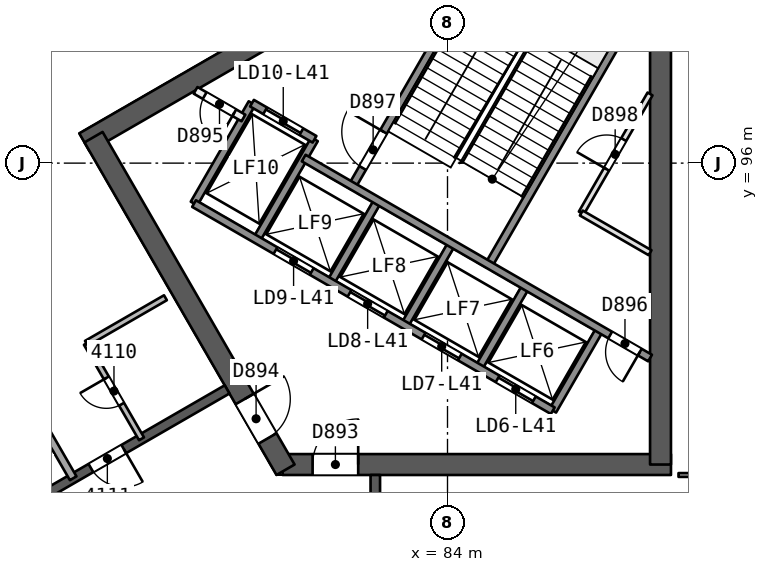
"""IFC4 building model, lengths in metres.
Left out: names, types, materials, properties, quantities, classifications, styles, units other than length and angle.
Written with IfcOpenShell. Run it as: python <this file> out.ifc"""

import sys

from ifc_helpers import new_model, si_unit, direction, frame, frame_2d, origin, place, context, subcontext, project, spatial, rectangle, extrude, element, fill, save


model = new_model("IFC4")
c1 = context("Model", 3, precision=1e-05, world=origin(), true_north=direction((0.0, 1.0)))
c2 = subcontext(c1, "Body", "Model", "MODEL_VIEW")
j1 = project(units=[si_unit("LENGTHUNIT", "METRE"), si_unit("PLANEANGLEUNIT", "RADIAN")], contexts=[c1])
p1 = place(None, origin())
s1 = spatial("IfcSite", under=j1, at=p1, CompositionType="ELEMENT")
p2 = place(p1, origin())
s2 = spatial("IfcBuilding", under=s1, at=p2, CompositionType="ELEMENT")
p3 = place(p2, frame((0.0, 0.0, 171.1)))
s3 = spatial("IfcBuildingStorey", under=s2, at=p3, CompositionType="ELEMENT", Elevation=171.1)
p4 = place(p3, frame((79.659, 88.069, 0.0), z_axis=(0.0, 0.0, 1.0), x_axis=(1.0, 0.0, 0.0)))
e1 = element("IfcWall", 1, at=p4, inside=s3, PredefinedType="SHEAR", context=c2, shape_type="SweptSolid", body=[
    extrude(rectangle(XDim=10.221, YDim=0.55, at=frame_2d((5.111, 0.0))), origin(), (0.0, 0.0, 1.0), 3.7),
])
p5 = place(p4, frame((0.791, 0.0, 0.0)))
e2 = element("IfcOpeningElement", 2, at=p5, cuts=e1, PredefinedType="OPENING", context=c2, shape_type="SweptSolid", body=[
    extrude(rectangle(XDim=1.2, YDim=2.1, at=frame_2d((0.6, 1.05))), frame((0.0, 0.286, 0.0), z_axis=(0.0, -1.0, 0.0), x_axis=(1.0, 0.0, 0.0)), (0.0, 0.0, 1.0), 0.571),
])
p6 = place(p3, frame((89.605, 88.069, 0.0), z_axis=(0.0, 0.0, 1.0), x_axis=(0.0, 1.0, 0.0)))
e3 = element("IfcWall", 3, at=p6, inside=s3, PredefinedType="SHEAR", context=c2, shape_type="SweptSolid", body=[
    extrude(rectangle(XDim=14.058, YDim=0.55, at=frame_2d((7.029, 0.0))), origin(), (0.0, 0.0, 1.0), 3.7),
])
p7 = place(p3, frame((86.723, 103.633, 0.0), z_axis=(0.0, 0.0, 1.0), x_axis=(-0.866023530946, -0.500003243837, 0.0)))
e4 = element("IfcWall", 4, at=p7, inside=s3, PredefinedType="SHEAR", context=c2, shape_type="SweptSolid", body=[
    extrude(rectangle(XDim=14.175, YDim=0.55, at=frame_2d((7.087, 0.0))), origin(), (0.0, 0.0, 1.0), 3.7),
])
p8 = place(p3, frame((74.686, 96.683, 0.0), z_axis=(0.0, 0.0, 1.0), x_axis=(0.499997818338, -0.866026663364, 0.0)))
e5 = element("IfcWall", 5, at=p8, inside=s3, PredefinedType="SHEAR", context=c2, shape_type="SweptSolid", body=[
    extrude(rectangle(XDim=10.105, YDim=0.55, at=frame_2d((5.052, 0.0))), origin(), (0.0, 0.0, 1.0), 3.7),
])
p9 = place(p8, frame((7.955, 0.0, 0.0)))
e6 = element("IfcOpeningElement", 6, at=p9, cuts=e5, PredefinedType="OPENING", context=c2, shape_type="SweptSolid", body=[
    extrude(rectangle(XDim=1.2, YDim=2.1, at=frame_2d((0.6, 1.05))), frame((0.0, 0.286, 0.0), z_axis=(0.0, -1.0, 0.0), x_axis=(1.0, 0.0, 0.0)), (0.0, 0.0, 1.0), 0.571),
])
p10 = place(p3, frame((82.1, 72.206, 0.0), z_axis=(0.0, 0.0, 1.0), x_axis=(0.0, 1.0, 0.0)))
e7 = element("IfcWall", 7, at=p10, inside=s3, PredefinedType="SHEAR", context=c2, shape_type="SweptSolid", body=[
    extrude(rectangle(XDim=15.588, YDim=0.25, at=frame_2d((7.794, 0.0))), origin(), (0.0, 0.0, 1.0), 3.25),
])
p11 = place(p10, frame((2.618, 0.0, 0.0)))
e8 = element("IfcOpeningElement", 8, at=p11, cuts=e7, PredefinedType="OPENING", context=c2, shape_type="SweptSolid", body=[
    extrude(rectangle(XDim=1.0, YDim=2.1, at=frame_2d((0.5, 1.05))), frame((0.0, 0.135, 0.0), z_axis=(0.0, -1.0, 0.0), x_axis=(1.0, 0.0, 0.0)), (0.0, 0.0, 1.0), 0.271),
])
p12 = place(p10, frame((8.285, 0.0, 0.0)))
e9 = element("IfcOpeningElement", 9, at=p12, cuts=e7, PredefinedType="OPENING", context=c2, shape_type="SweptSolid", body=[
    extrude(rectangle(XDim=1.2, YDim=2.4, at=frame_2d((0.6, 1.2))), frame((0.0, 0.135, 0.0), z_axis=(0.0, -1.0, 0.0), x_axis=(1.0, 0.0, 0.0)), (0.0, 0.0, 1.0), 0.271),
])
p13 = place(p10, frame((13.062, 0.0, 0.0)))
e10 = element("IfcOpeningElement", 10, at=p13, cuts=e7, PredefinedType="OPENING", context=c2, shape_type="SweptSolid", body=[
    extrude(rectangle(XDim=1.0, YDim=2.1, at=frame_2d((0.5, 1.05))), frame((0.0, 0.135, 0.0), z_axis=(0.0, -1.0, 0.0), x_axis=(1.0, 0.0, 0.0)), (0.0, 0.0, 1.0), 0.271),
])
p14 = place(p3, frame((78.2, 90.046, 0.0), z_axis=(0.0, 0.0, 1.0), x_axis=(-0.866026492143, -0.499998114903, 0.0)))
e11 = element("IfcWall", 11, at=p14, inside=s3, PredefinedType="SHEAR", context=c2, shape_type="SweptSolid", body=[
    extrude(rectangle(XDim=15.588, YDim=0.25, at=frame_2d((7.794, 0.0))), origin(), (0.0, 0.0, 1.0), 3.25),
])
p15 = place(p14, frame((3.138, 0.0, 0.0)))
e12 = element("IfcOpeningElement", 12, at=p15, cuts=e11, PredefinedType="OPENING", context=c2, shape_type="SweptSolid", body=[
    extrude(rectangle(XDim=1.0, YDim=2.1, at=frame_2d((0.5, 1.05))), frame((0.0, 0.135, 0.0), z_axis=(0.0, -1.0, 0.0), x_axis=(1.0, 0.0, 0.0)), (0.0, 0.0, 1.0), 0.271),
])
p16 = place(p14, frame((5.629, 0.0, 0.0)))
e13 = element("IfcOpeningElement", 13, at=p16, cuts=e11, PredefinedType="OPENING", context=c2, shape_type="SweptSolid", body=[
    extrude(rectangle(XDim=0.9, YDim=2.1, at=frame_2d((0.45, 1.05))), frame((0.0, 0.135, 0.0), z_axis=(0.0, -1.0, 0.0), x_axis=(1.0, 0.0, 0.0)), (0.0, 0.0, 1.0), 0.271),
])
p17 = place(p14, frame((8.435, 0.0, 0.0)))
e14 = element("IfcOpeningElement", 14, at=p17, cuts=e11, PredefinedType="OPENING", context=c2, shape_type="SweptSolid", body=[
    extrude(rectangle(XDim=0.9, YDim=2.1, at=frame_2d((0.45, 1.05))), frame((0.0, 0.135, 0.0), z_axis=(0.0, -1.0, 0.0), x_axis=(1.0, 0.0, 0.0)), (0.0, 0.0, 1.0), 0.271),
])
p18 = place(p14, frame((12.438, 0.0, 0.0)))
e15 = element("IfcOpeningElement", 15, at=p18, cuts=e11, PredefinedType="OPENING", context=c2, shape_type="SweptSolid", body=[
    extrude(rectangle(XDim=1.0, YDim=2.1, at=frame_2d((0.5, 1.05))), frame((0.0, 0.135, 0.0), z_axis=(0.0, -1.0, 0.0), x_axis=(1.0, 0.0, 0.0)), (0.0, 0.0, 1.0), 0.271),
])
p19 = place(p3, frame((93.502, 87.794, 0.0), z_axis=(0.0, 0.0, 1.0), x_axis=(-1.0, 0.0, 0.0)))
e16 = element("IfcWall", 16, at=p19, inside=s3, PredefinedType="PARTITIONING", context=c2, shape_type="SweptSolid", body=[
    extrude(rectangle(XDim=3.423, YDim=0.1, at=frame_2d((1.712, 0.0))), origin(), (0.0, 0.0, 1.0), 3.25),
])
p20 = place(p19, frame((1.262, 0.0, 0.0)))
e17 = element("IfcOpeningElement", 17, at=p20, cuts=e16, PredefinedType="OPENING", context=c2, shape_type="SweptSolid", body=[
    extrude(rectangle(XDim=0.9, YDim=2.1, at=frame_2d((0.45, 1.05))), frame((0.0, 0.061, 0.0), z_axis=(0.0, -1.0, 0.0), x_axis=(1.0, 0.0, 0.0)), (0.0, 0.0, 1.0), 0.121),
])
p21 = place(p3, frame((75.948, 88.746, 0.0), z_axis=(0.0, 0.0, 1.0), x_axis=(-0.499987231761, 0.866032775405, 0.0)))
e18 = element("IfcWall", 18, at=p21, inside=s3, PredefinedType="PARTITIONING", context=c2, shape_type="SweptSolid", body=[
    extrude(rectangle(XDim=2.9, YDim=0.15, at=frame_2d((1.45, 0.0))), origin(), (0.0, 0.0, 1.0), 3.25),
])
p22 = place(p21, frame((1.05, 0.0, 0.0)))
e19 = element("IfcOpeningElement", 19, at=p22, cuts=e18, PredefinedType="OPENING", context=c2, shape_type="SweptSolid", body=[
    extrude(rectangle(XDim=0.8, YDim=2.1, at=frame_2d((0.4, 1.05))), frame((0.0, 0.085, 0.0), z_axis=(0.0, -1.0, 0.0), x_axis=(1.0, 0.0, 0.0)), (0.0, 0.0, 1.0), 0.171),
])
p23 = place(p3, frame((74.498, 91.257, 0.0), z_axis=(0.0, 0.0, 1.0), x_axis=(0.866038271014, 0.499977712642, 0.0)))
e20 = element("IfcWall", 20, at=p23, inside=s3, PredefinedType="PARTITIONING", context=c2, shape_type="SweptSolid", body=[
    extrude(rectangle(XDim=2.401, YDim=0.15, at=frame_2d((1.2, 0.0))), origin(), (0.0, 0.0, 1.0), 3.25),
])
p24 = place(p3, frame((68.449, 97.582, 0.0), z_axis=(0.0, 0.0, 1.0), x_axis=(0.499998613539, -0.866026204257, 0.0)))
e21 = element("IfcWall", 21, at=p24, inside=s3, PredefinedType="PARTITIONING", context=c2, shape_type="SweptSolid", body=[
    extrude(rectangle(XDim=11.402, YDim=0.2, at=frame_2d((5.701, 0.0))), origin(), (0.0, 0.0, 1.0), 3.25),
])
p25 = place(p3, frame((42.45, 82.744, 0.0), z_axis=(0.0, 0.0, 1.0), x_axis=(0.866024128163, 0.500002209434, 0.0)))
e22 = element("IfcWall", 22, at=p25, inside=s3, PredefinedType="SOLIDWALL", context=c2, shape_type="SweptSolid", body=[
    extrude(rectangle(XDim=53.635, YDim=0.3, at=frame_2d((26.817, 0.0))), origin(), (0.0, 0.0, 1.0), 3.25),
])
p26 = place(p25, frame((20.473, 0.0, 0.0)))
e23 = element("IfcOpeningElement", 23, at=p26, cuts=e22, PredefinedType="OPENING", context=c2, shape_type="SweptSolid", body=[
    extrude(rectangle(XDim=2.4, YDim=2.4, at=frame_2d((1.2, 1.2))), frame((0.0, 0.161, 0.0), z_axis=(0.0, -1.0, 0.0), x_axis=(1.0, 0.0, 0.0)), (0.0, 0.0, 1.0), 0.321),
])
p27 = place(p25, frame((9.514, 0.0, 0.0)))
e24 = element("IfcOpeningElement", 24, at=p27, cuts=e22, PredefinedType="OPENING", context=c2, shape_type="SweptSolid", body=[
    extrude(rectangle(XDim=2.4, YDim=2.4, at=frame_2d((1.2, 1.2))), frame((0.0, 0.161, 0.0), z_axis=(0.0, -1.0, 0.0), x_axis=(1.0, 0.0, 0.0)), (0.0, 0.0, 1.0), 0.321),
])
p28 = place(p25, frame((40.628, 0.0, 0.0)))
e25 = element("IfcOpeningElement", 25, at=p28, cuts=e22, PredefinedType="OPENING", context=c2, shape_type="SweptSolid", body=[
    extrude(rectangle(XDim=2.4, YDim=2.4, at=frame_2d((1.2, 1.2))), frame((0.0, 0.161, 0.0), z_axis=(0.0, -1.0, 0.0), x_axis=(1.0, 0.0, 0.0)), (0.0, 0.0, 1.0), 0.321),
])
p29 = place(p25, frame((27.632, 0.0, 0.9)))
e26 = element("IfcOpeningElement", 26, at=p29, cuts=e22, PredefinedType="OPENING", context=c2, shape_type="SweptSolid", body=[
    extrude(rectangle(XDim=1.8, YDim=1.5, at=frame_2d((0.9, 0.75))), frame((0.0, 0.161, 0.0), z_axis=(0.0, -1.0, 0.0), x_axis=(1.0, 0.0, 0.0)), (0.0, 0.0, 1.0), 0.321),
])
p30 = place(p25, frame((24.826, 0.0, 0.9)))
e27 = element("IfcOpeningElement", 27, at=p30, cuts=e22, PredefinedType="OPENING", context=c2, shape_type="SweptSolid", body=[
    extrude(rectangle(XDim=1.8, YDim=1.5, at=frame_2d((0.9, 0.75))), frame((0.0, 0.161, 0.0), z_axis=(0.0, -1.0, 0.0), x_axis=(1.0, 0.0, 0.0)), (0.0, 0.0, 1.0), 0.321),
])
p31 = place(p3, frame((86.77, 89.486, 0.0), z_axis=(0.0, 0.0, 1.0), x_axis=(0.499961042966, 0.86604789447, 0.0)))
e28 = element("IfcWall", 28, at=p31, inside=s3, PredefinedType="SOLIDWALL", context=c2, shape_type="SweptSolid", body=[
    extrude(rectangle(XDim=2.48, YDim=0.2, at=frame_2d((1.24, 0.0))), origin(), (0.0, 0.0, 1.0), 3.25),
])
p32 = place(p3, frame((87.521, 94.687, 0.0), z_axis=(0.0, 0.0, 1.0), x_axis=(0.500043727655, 0.866000156139, 0.0)))
e29 = element("IfcWall", 29, at=p32, inside=s3, PredefinedType="PARTITIONING", context=c2, shape_type="SweptSolid", body=[
    extrude(rectangle(XDim=3.618, YDim=0.15, at=frame_2d((1.809, 0.0))), origin(), (0.0, 0.0, 1.0), 3.25),
])
p33 = place(p32, frame((1.332, 0.0, 0.0)))
e30 = element("IfcOpeningElement", 30, at=p33, cuts=e29, PredefinedType="OPENING", context=c2, shape_type="SweptSolid", body=[
    extrude(rectangle(XDim=0.9, YDim=2.1, at=frame_2d((0.45, 1.05))), frame((0.0, 0.085, 0.0), z_axis=(0.0, -1.0, 0.0), x_axis=(1.0, 0.0, 0.0)), (0.0, 0.0, 1.0), 0.171),
])
p34 = place(p3, frame((84.821, 90.611, 0.0), z_axis=(0.0, 0.0, 1.0), x_axis=(0.499961042966, 0.86604789447, 0.0)))
e31 = element("IfcWall", 31, at=p34, inside=s3, PredefinedType="SOLIDWALL", context=c2, shape_type="SweptSolid", body=[
    extrude(rectangle(XDim=2.48, YDim=0.2, at=frame_2d((1.24, 0.0))), origin(), (0.0, 0.0, 1.0), 3.25),
])
p35 = place(p3, frame((85.087, 93.321, 0.0), z_axis=(0.0, 0.0, 1.0), x_axis=(0.500019787375, 0.866013979237, 0.0)))
e32 = element("IfcWall", 32, at=p35, inside=s3, PredefinedType="SOLIDWALL", context=c2, shape_type="SweptSolid", body=[
    extrude(rectangle(XDim=7.7, YDim=0.2, at=frame_2d((3.85, 0.0))), origin(), (0.0, 0.0, 1.0), 3.25),
])
for number, where, z_axis, x_axis in (
    (33, (82.873, 91.736, 0.0), (0.0, 0.0, 1.0), (0.5, 0.866, 0.0)),
    (34, (80.924, 92.861, 0.0), (0.0, 0.0, 1.0), (0.5, 0.866, 0.0)),
):
    element("IfcWall", number, at=place(p3, frame(where, z_axis=z_axis, x_axis=x_axis)), inside=s3, PredefinedType="SOLIDWALL", context=c2, shape_type="SweptSolid", body=[
        extrude(rectangle(XDim=2.48, YDim=0.2, at=frame_2d((1.24, 0.0))), origin(), (0.0, 0.0, 1.0), 3.25),
    ])
p36 = place(p3, frame((81.493, 95.396, 0.0), z_axis=(0.0, 0.0, 1.0), x_axis=(0.500006057782, 0.866021906294, 0.0)))
e35 = element("IfcWall", 35, at=p36, inside=s3, PredefinedType="SOLIDWALL", context=c2, shape_type="SweptSolid", body=[
    extrude(rectangle(XDim=7.7, YDim=0.2, at=frame_2d((3.85, 0.0))), origin(), (0.0, 0.0, 1.0), 3.25),
])
p37 = place(p36, frame((0.55, 0.0, 0.0)))
e36 = element("IfcOpeningElement", 36, at=p37, cuts=e35, PredefinedType="OPENING", context=c2, shape_type="SweptSolid", body=[
    extrude(rectangle(XDim=1.1, YDim=2.1, at=frame_2d((0.55, 1.05))), frame((0.0, 0.11, 0.0), z_axis=(0.0, -1.0, 0.0), x_axis=(1.0, 0.0, 0.0)), (0.0, 0.0, 1.0), 0.221),
])
for number, where, z_axis, x_axis in (
    (37, (78.976, 93.986, 0.0), (0.0, 0.0, 1.0), (0.5, 0.866, 0.0)),
    (38, (77.33, 94.936, 0.0), (0.0, 0.0, 1.0), (0.5, 0.866, 0.0)),
):
    element("IfcWall", number, at=place(p3, frame(where, z_axis=z_axis, x_axis=x_axis)), inside=s3, PredefinedType="SOLIDWALL", context=c2, shape_type="SweptSolid", body=[
        extrude(rectangle(XDim=3.05, YDim=0.2, at=frame_2d((1.525, 0.0))), origin(), (0.0, 0.0, 1.0), 3.25),
    ])
p38 = place(p3, frame((86.77, 89.486, 0.0), z_axis=(0.0, 0.0, 1.0), x_axis=(-0.86601811187, 0.500012629753, 0.0)))
e39 = element("IfcWall", 39, at=p38, inside=s3, PredefinedType="SOLIDWALL", context=c2, shape_type="SweptSolid", body=[
    extrude(rectangle(XDim=10.9, YDim=0.2, at=frame_2d((5.45, 0.0))), origin(), (0.0, 0.0, 1.0), 3.25),
])
p39 = place(p38, frame((0.575, 0.0, 0.0)))
e40 = element("IfcOpeningElement", 40, at=p39, cuts=e39, PredefinedType="OPENING", context=c2, shape_type="SweptSolid", body=[
    extrude(rectangle(XDim=1.1, YDim=2.1, at=frame_2d((0.55, 1.05))), frame((0.0, 0.11, 0.0), z_axis=(0.0, -1.0, 0.0), x_axis=(1.0, 0.0, 0.0)), (0.0, 0.0, 1.0), 0.221),
])
p40 = place(p38, frame((2.825, 0.0, 0.0)))
e41 = element("IfcOpeningElement", 41, at=p40, cuts=e39, PredefinedType="OPENING", context=c2, shape_type="SweptSolid", body=[
    extrude(rectangle(XDim=1.1, YDim=2.1, at=frame_2d((0.55, 1.05))), frame((0.0, 0.11, 0.0), z_axis=(0.0, -1.0, 0.0), x_axis=(1.0, 0.0, 0.0)), (0.0, 0.0, 1.0), 0.221),
])
p41 = place(p38, frame((5.075, 0.0, 0.0)))
e42 = element("IfcOpeningElement", 42, at=p41, cuts=e39, PredefinedType="OPENING", context=c2, shape_type="SweptSolid", body=[
    extrude(rectangle(XDim=1.1, YDim=2.1, at=frame_2d((0.55, 1.05))), frame((0.0, 0.11, 0.0), z_axis=(0.0, -1.0, 0.0), x_axis=(1.0, 0.0, 0.0)), (0.0, 0.0, 1.0), 0.221),
])
p42 = place(p38, frame((7.325, 0.0, 0.0)))
e43 = element("IfcOpeningElement", 43, at=p42, cuts=e39, PredefinedType="OPENING", context=c2, shape_type="SweptSolid", body=[
    extrude(rectangle(XDim=1.1, YDim=2.1, at=frame_2d((0.55, 1.05))), frame((0.0, 0.11, 0.0), z_axis=(0.0, -1.0, 0.0), x_axis=(1.0, 0.0, 0.0)), (0.0, 0.0, 1.0), 0.221),
])
p43 = place(p3, frame((89.33, 90.872, 0.0), z_axis=(0.0, 0.0, 1.0), x_axis=(-0.866027589512, 0.49999621419, 0.0)))
e44 = element("IfcWall", 44, at=p43, inside=s3, PredefinedType="SOLIDWALL", context=c2, shape_type="SweptSolid", body=[
    extrude(rectangle(XDim=10.524, YDim=0.2, at=frame_2d((5.262, 0.0))), origin(), (0.0, 0.0, 1.0), 3.25),
])
p44 = place(p43, frame((0.312, 0.0, 0.0)))
e45 = element("IfcOpeningElement", 45, at=p44, cuts=e44, PredefinedType="OPENING", context=c2, shape_type="SweptSolid", body=[
    extrude(rectangle(XDim=0.9, YDim=2.1, at=frame_2d((0.45, 1.05))), frame((0.0, 0.11, 0.0), z_axis=(0.0, -1.0, 0.0), x_axis=(1.0, 0.0, 0.0)), (0.0, 0.0, 1.0), 0.221),
])
p45 = place(p3, frame((78.63, 97.188, 0.0), z_axis=(0.0, 0.0, 1.0), x_axis=(-0.866003949776, 0.500037157592, 0.0)))
e46 = element("IfcWall", 46, at=p45, inside=s3, PredefinedType="PARTITIONING", context=c2, shape_type="SweptSolid", body=[
    extrude(rectangle(XDim=1.455, YDim=0.2, at=frame_2d((0.728, 0.0))), origin(), (0.0, 0.0, 1.0), 3.25),
])
p46 = place(p45, frame((0.278, 0.0, 0.0)))
e47 = element("IfcOpeningElement", 47, at=p46, cuts=e46, PredefinedType="OPENING", context=c2, shape_type="SweptSolid", body=[
    extrude(rectangle(XDim=0.9, YDim=2.1, at=frame_2d((0.45, 1.05))), frame((0.0, 0.11, 0.0), z_axis=(0.0, -1.0, 0.0), x_axis=(1.0, 0.0, 0.0)), (0.0, 0.0, 1.0), 0.221),
])
p47 = place(p3, frame((80.5, 96.627, 0.0), z_axis=(0.0, 0.0, 1.0), x_axis=(-0.86601224135, 0.500022797313, 0.0)))
e48 = element("IfcWall", 48, at=p47, inside=s3, PredefinedType="SOLIDWALL", context=c2, shape_type="SweptSolid", body=[
    extrude(rectangle(XDim=1.9, YDim=0.2, at=frame_2d((0.95, 0.0))), origin(), (0.0, 0.0, 1.0), 3.25),
])
p48 = place(p47, frame((0.4, 0.0, 0.0)))
e49 = element("IfcOpeningElement", 49, at=p48, cuts=e48, PredefinedType="OPENING", context=c2, shape_type="SweptSolid", body=[
    extrude(rectangle(XDim=1.1, YDim=2.1, at=frame_2d((0.55, 1.05))), frame((0.0, 0.11, 0.0), z_axis=(0.0, -1.0, 0.0), x_axis=(1.0, 0.0, 0.0)), (0.0, 0.0, 1.0), 0.221),
])
p49 = place(p3, frame((89.33, 93.643, 0.0), z_axis=(0.0, 0.0, 1.0), x_axis=(-0.866033778982, 0.499985493453, 0.0)))
e50 = element("IfcWall", 50, at=p49, inside=s3, PredefinedType="PARTITIONING", context=c2, shape_type="SweptSolid", body=[
    extrude(rectangle(XDim=2.089, YDim=0.15, at=frame_2d((1.044, 0.0))), origin(), (0.0, 0.0, 1.0), 3.25),
])
p50 = place(p22, origin())
e51 = element("IfcDoor", 51, at=p50, inside=s3, OperationType="SINGLE_SWING_RIGHT", PredefinedType="NOTDEFINED", context=c2, shape_type="SweptSolid", body=[
    extrude(rectangle(XDim=0.8, YDim=2.1, at=frame_2d((0.4, 1.05))), frame((0.0, 0.025, 0.0), z_axis=(0.0, -1.0, 0.0), x_axis=(1.0, 0.0, 0.0)), (0.0, 0.0, 1.0), 0.05),
])
fill(e19, e51)
p51 = place(p15, origin())
e52 = element("IfcDoor", 52, at=p51, inside=s3, OperationType="SINGLE_SWING_LEFT", PredefinedType="NOTDEFINED", context=c2, shape_type="SweptSolid", body=[
    extrude(rectangle(XDim=1.0, YDim=2.1, at=frame_2d((0.5, 1.05))), frame((0.0, 0.025, 0.0), z_axis=(0.0, -1.0, 0.0), x_axis=(1.0, 0.0, 0.0)), (0.0, 0.0, 1.0), 0.05),
])
fill(e12, e52)
p52 = place(p5, origin())
e53 = element("IfcDoor", 53, at=p52, inside=s3, OperationType="SINGLE_SWING_RIGHT", PredefinedType="NOTDEFINED", context=c2, shape_type="SweptSolid", body=[
    extrude(rectangle(XDim=1.2, YDim=2.1, at=frame_2d((0.6, 1.05))), frame((0.0, 0.025, 0.0), z_axis=(0.0, -1.0, 0.0), x_axis=(1.0, 0.0, 0.0)), (0.0, 0.0, 1.0), 0.05),
])
fill(e2, e53)
p53 = place(p9, origin())
e54 = element("IfcDoor", 54, at=p53, inside=s3, OperationType="SINGLE_SWING_LEFT", PredefinedType="NOTDEFINED", context=c2, shape_type="SweptSolid", body=[
    extrude(rectangle(XDim=1.2, YDim=2.1, at=frame_2d((0.6, 1.05))), frame((0.0, 0.025, 0.0), z_axis=(0.0, -1.0, 0.0), x_axis=(1.0, 0.0, 0.0)), (0.0, 0.0, 1.0), 0.05),
])
fill(e6, e54)
p54 = place(p39, origin())
e55 = element("IfcDoor", 55, at=p54, inside=s3, OperationType="SLIDING_TO_RIGHT", PredefinedType="NOTDEFINED", context=c2, shape_type="SweptSolid", body=[
    extrude(rectangle(XDim=1.1, YDim=2.1, at=frame_2d((0.55, 1.05))), frame((0.0, 0.025, 0.0), z_axis=(0.0, -1.0, 0.0), x_axis=(1.0, 0.0, 0.0)), (0.0, 0.0, 1.0), 0.05),
])
fill(e40, e55)
p55 = place(p40, origin())
e56 = element("IfcDoor", 56, at=p55, inside=s3, OperationType="SLIDING_TO_LEFT", PredefinedType="NOTDEFINED", context=c2, shape_type="SweptSolid", body=[
    extrude(rectangle(XDim=1.1, YDim=2.1, at=frame_2d((0.55, 1.05))), frame((0.0, 0.025, 0.0), z_axis=(0.0, -1.0, 0.0), x_axis=(1.0, 0.0, 0.0)), (0.0, 0.0, 1.0), 0.05),
])
fill(e41, e56)
p56 = place(p41, origin())
e57 = element("IfcDoor", 57, at=p56, inside=s3, OperationType="SLIDING_TO_RIGHT", PredefinedType="NOTDEFINED", context=c2, shape_type="SweptSolid", body=[
    extrude(rectangle(XDim=1.1, YDim=2.1, at=frame_2d((0.55, 1.05))), frame((0.0, 0.025, 0.0), z_axis=(0.0, -1.0, 0.0), x_axis=(1.0, 0.0, 0.0)), (0.0, 0.0, 1.0), 0.05),
])
fill(e42, e57)
p57 = place(p42, origin())
e58 = element("IfcDoor", 58, at=p57, inside=s3, OperationType="SLIDING_TO_LEFT", PredefinedType="NOTDEFINED", context=c2, shape_type="SweptSolid", body=[
    extrude(rectangle(XDim=1.1, YDim=2.1, at=frame_2d((0.55, 1.05))), frame((0.0, 0.025, 0.0), z_axis=(0.0, -1.0, 0.0), x_axis=(1.0, 0.0, 0.0)), (0.0, 0.0, 1.0), 0.05),
])
fill(e43, e58)
p58 = place(p48, origin())
e59 = element("IfcDoor", 59, at=p58, inside=s3, OperationType="SLIDING_TO_RIGHT", PredefinedType="NOTDEFINED", context=c2, shape_type="SweptSolid", body=[
    extrude(rectangle(XDim=1.1, YDim=2.1, at=frame_2d((0.55, 1.05))), frame((0.0, 0.025, 0.0), z_axis=(0.0, -1.0, 0.0), x_axis=(1.0, 0.0, 0.0)), (0.0, 0.0, 1.0), 0.05),
])
fill(e49, e59)
p59 = place(p46, origin())
e60 = element("IfcDoor", 60, at=p59, inside=s3, OperationType="SINGLE_SWING_LEFT", PredefinedType="NOTDEFINED", context=c2, shape_type="SweptSolid", body=[
    extrude(rectangle(XDim=0.9, YDim=2.1, at=frame_2d((0.45, 1.05))), frame((0.0, 0.025, 0.0), z_axis=(0.0, -1.0, 0.0), x_axis=(1.0, 0.0, 0.0)), (0.0, 0.0, 1.0), 0.05),
])
fill(e47, e60)
p60 = place(p44, origin())
e61 = element("IfcDoor", 61, at=p60, inside=s3, OperationType="SINGLE_SWING_LEFT", PredefinedType="NOTDEFINED", context=c2, shape_type="SweptSolid", body=[
    extrude(rectangle(XDim=0.9, YDim=2.1, at=frame_2d((0.45, 1.05))), frame((0.0, 0.025, 0.0), z_axis=(0.0, -1.0, 0.0), x_axis=(1.0, 0.0, 0.0)), (0.0, 0.0, 1.0), 0.05),
])
fill(e45, e61)
p61 = place(p37, origin())
e62 = element("IfcDoor", 62, at=p61, inside=s3, OperationType="SINGLE_SWING_RIGHT", PredefinedType="NOTDEFINED", context=c2, shape_type="SweptSolid", body=[
    extrude(rectangle(XDim=1.1, YDim=2.1, at=frame_2d((0.55, 1.05))), frame((0.0, 0.025, 0.0), z_axis=(0.0, -1.0, 0.0), x_axis=(1.0, 0.0, 0.0)), (0.0, 0.0, 1.0), 0.05),
])
fill(e36, e62)
p62 = place(p33, origin())
e63 = element("IfcDoor", 63, at=p62, inside=s3, OperationType="SINGLE_SWING_LEFT", PredefinedType="NOTDEFINED", context=c2, shape_type="SweptSolid", body=[
    extrude(rectangle(XDim=0.9, YDim=2.1, at=frame_2d((0.45, 1.05))), frame((0.0, 0.025, 0.0), z_axis=(0.0, -1.0, 0.0), x_axis=(1.0, 0.0, 0.0)), (0.0, 0.0, 1.0), 0.05),
])
fill(e30, e63)
save(model, sys.argv[1])
